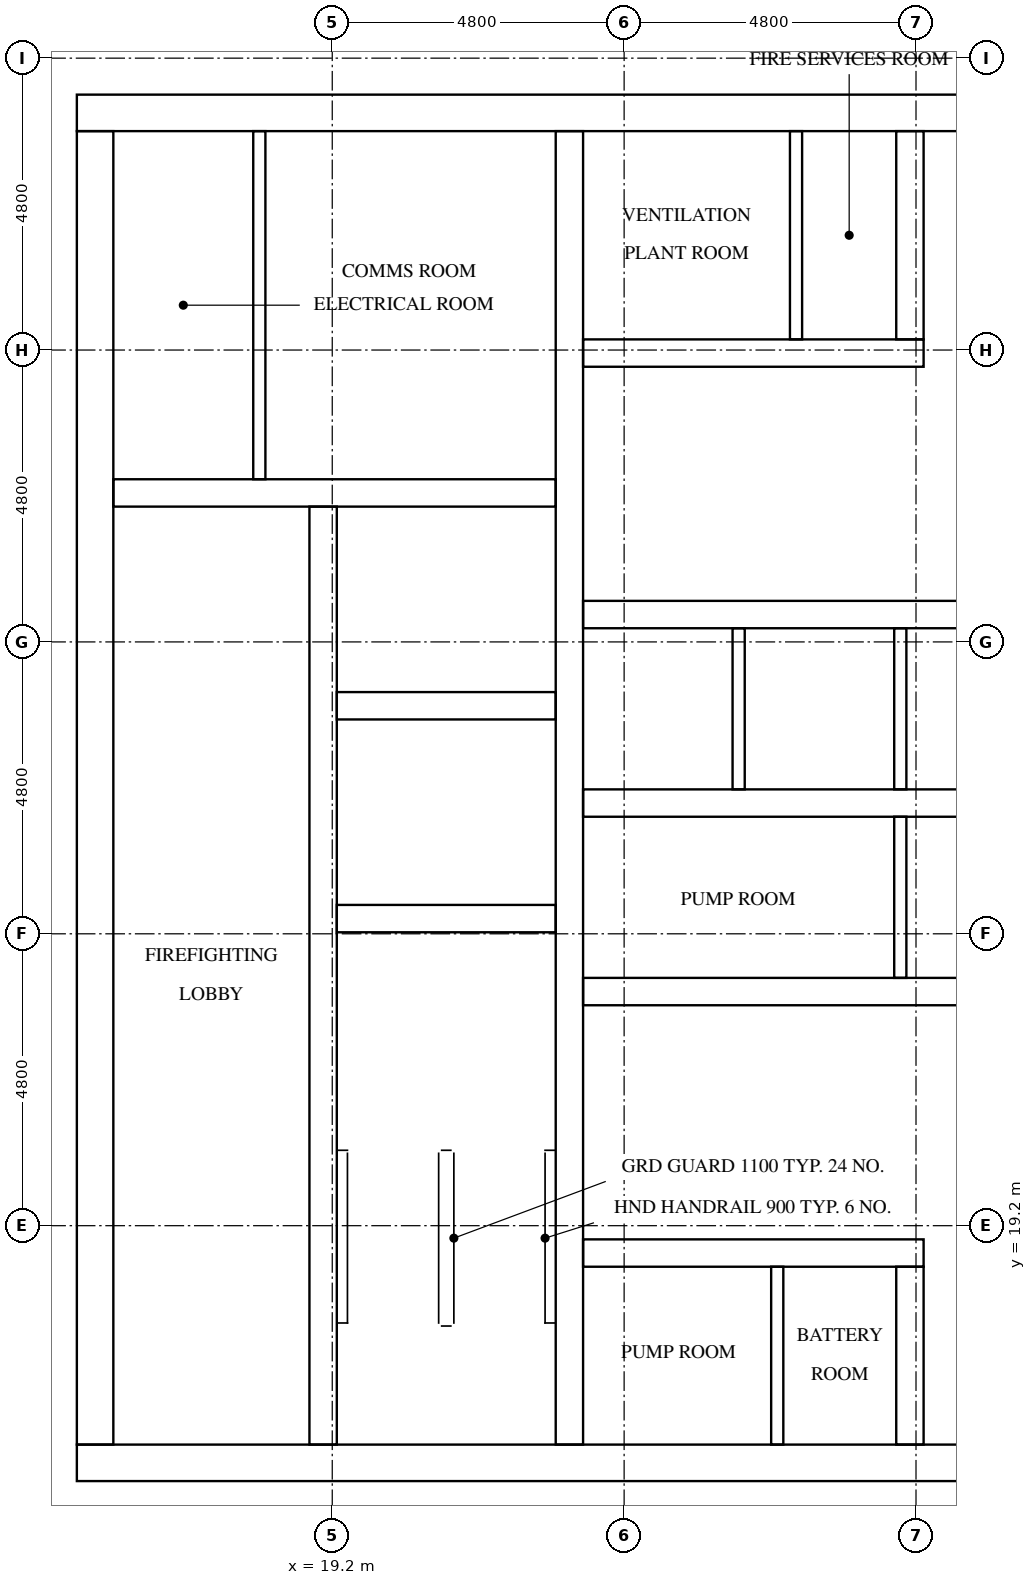
"""IFC4 building model, lengths in metres.
Left out: names, types, materials, properties, quantities, classifications, styles, units other than length and angle.
Written with IfcOpenShell. Run it as: python <this file> out.ifc"""

import sys

from ifc_helpers import new_model, si_unit, direction, frame, frame_2d, origin, place, context, subcontext, project, spatial, rectangle, extrude, element, fill, save


model = new_model("IFC4")
c1 = context("Model", 3, precision=1e-05, world=origin(), true_north=direction((0.0, 1.0)))
c2 = subcontext(c1, "Body", "Model", "MODEL_VIEW")
j1 = project(units=[si_unit("LENGTHUNIT", "METRE"), si_unit("PLANEANGLEUNIT", "RADIAN")], contexts=[c1])
p1 = place(None, origin())
s1 = spatial("IfcSite", under=j1, at=p1, CompositionType="ELEMENT")
p2 = place(p1, origin())
s2 = spatial("IfcBuilding", under=s1, at=p2, CompositionType="ELEMENT")
p3 = place(p2, frame((0.0, 0.0, 249.2)))
s3 = spatial("IfcBuildingStorey", under=s2, at=p3, CompositionType="ELEMENT", Elevation=249.2)
p4 = place(p3, frame((15.0, 15.3, 0.0), z_axis=(0.0, 0.0, 1.0), x_axis=(1.0, 0.0, 0.0)))
e1 = element("IfcWall", 1, at=p4, inside=s3, PredefinedType="SHEAR", context=c2, shape_type="SweptSolid", body=[
    extrude(rectangle(XDim=32.4, YDim=0.6, at=frame_2d((16.2, 0.0))), origin(), (0.0, 0.0, 1.0), 3.2),
])
p5 = place(p4, frame((15.3, 0.0, 0.0)))
e2 = element("IfcOpeningElement", 2, at=p5, cuts=e1, PredefinedType="OPENING", context=c2, shape_type="SweptSolid", body=[
    extrude(rectangle(XDim=1.8, YDim=2.1, at=frame_2d((0.9, 1.05))), frame((0.0, 0.31, 0.0), z_axis=(0.0, -1.0, 0.0), x_axis=(1.0, 0.0, 0.0)), (0.0, 0.0, 1.0), 0.62),
])
p6 = place(p3, frame((15.0, 37.5, 0.0), z_axis=(0.0, 0.0, 1.0), x_axis=(1.0, 0.0, 0.0)))
e3 = element("IfcWall", 3, at=p6, inside=s3, PredefinedType="SHEAR", context=c2, shape_type="SweptSolid", body=[
    extrude(rectangle(XDim=32.4, YDim=0.6, at=frame_2d((16.2, 0.0))), origin(), (0.0, 0.0, 1.0), 3.2),
])
p7 = place(p6, frame((15.3, 0.0, 0.0)))
e4 = element("IfcOpeningElement", 4, at=p7, cuts=e3, PredefinedType="OPENING", context=c2, shape_type="SweptSolid", body=[
    extrude(rectangle(XDim=1.8, YDim=2.1, at=frame_2d((0.9, 1.05))), frame((0.0, 0.31, 0.0), z_axis=(0.0, -1.0, 0.0), x_axis=(1.0, 0.0, 0.0)), (0.0, 0.0, 1.0), 0.62),
])
p8 = place(p6, frame((1.25, 0.0, 0.0)))
e5 = element("IfcOpeningElement", 5, at=p8, cuts=e3, PredefinedType="OPENING", context=c2, shape_type="SweptSolid", body=[
    extrude(rectangle(XDim=1.0, YDim=2.1, at=frame_2d((0.5, 1.05))), frame((0.0, 0.31, 0.0), z_axis=(0.0, -1.0, 0.0), x_axis=(1.0, 0.0, 0.0)), (0.0, 0.0, 1.0), 0.62),
])
p9 = place(p6, frame((4.988, 0.0, 0.0)))
e6 = element("IfcOpeningElement", 6, at=p9, cuts=e3, PredefinedType="OPENING", context=c2, shape_type="SweptSolid", body=[
    extrude(rectangle(XDim=1.0, YDim=2.1, at=frame_2d((0.5, 1.05))), frame((0.0, 0.31, 0.0), z_axis=(0.0, -1.0, 0.0), x_axis=(1.0, 0.0, 0.0)), (0.0, 0.0, 1.0), 0.62),
])
p10 = place(p3, frame((15.3, 15.6, 0.0), z_axis=(0.0, 0.0, 1.0), x_axis=(0.0, 1.0, 0.0)))
e7 = element("IfcWall", 7, at=p10, inside=s3, PredefinedType="SHEAR", context=c2, shape_type="SweptSolid", body=[
    extrude(rectangle(XDim=21.6, YDim=0.6, at=frame_2d((10.8, 0.0))), origin(), (0.0, 0.0, 1.0), 3.2),
])
p11 = place(p10, frame((5.16, 0.0, 0.0)))
e8 = element("IfcOpeningElement", 8, at=p11, cuts=e7, PredefinedType="OPENING", context=c2, shape_type="SweptSolid", body=[
    extrude(rectangle(XDim=1.2, YDim=2.1, at=frame_2d((0.6, 1.05))), frame((0.0, 0.31, 0.0), z_axis=(0.0, -1.0, 0.0), x_axis=(1.0, 0.0, 0.0)), (0.0, 0.0, 1.0), 0.62),
])
p12 = place(p3, frame((19.05, 15.6, 0.0), z_axis=(0.0, 0.0, 1.0), x_axis=(0.0, 1.0, 0.0)))
e9 = element("IfcWall", 9, at=p12, inside=s3, PredefinedType="SHEAR", context=c2, shape_type="SweptSolid", body=[
    extrude(rectangle(XDim=15.425, YDim=0.45, at=frame_2d((7.712, 0.0))), origin(), (0.0, 0.0, 1.0), 3.2),
])
p13 = place(p12, frame((9.85, 0.0, 0.0)))
e10 = element("IfcOpeningElement", 10, at=p13, cuts=e9, PredefinedType="OPENING", context=c2, shape_type="SweptSolid", body=[
    extrude(rectangle(XDim=1.1, YDim=2.1, at=frame_2d((0.55, 1.05))), frame((0.0, 0.235, 0.0), z_axis=(0.0, -1.0, 0.0), x_axis=(1.0, 0.0, 0.0)), (0.0, 0.0, 1.0), 0.47),
])
p14 = place(p12, frame((13.35, 0.0, 0.0)))
e11 = element("IfcOpeningElement", 11, at=p14, cuts=e9, PredefinedType="OPENING", context=c2, shape_type="SweptSolid", body=[
    extrude(rectangle(XDim=1.1, YDim=2.1, at=frame_2d((0.55, 1.05))), frame((0.0, 0.235, 0.0), z_axis=(0.0, -1.0, 0.0), x_axis=(1.0, 0.0, 0.0)), (0.0, 0.0, 1.0), 0.47),
])
p15 = place(p12, frame((0.6, 0.0, 0.0)))
e12 = element("IfcOpeningElement", 12, at=p15, cuts=e9, PredefinedType="OPENING", context=c2, shape_type="SweptSolid", body=[
    extrude(rectangle(XDim=1.2, YDim=2.1, at=frame_2d((0.6, 1.05))), frame((0.0, 0.235, 0.0), z_axis=(0.0, -1.0, 0.0), x_axis=(1.0, 0.0, 0.0)), (0.0, 0.0, 1.0), 0.47),
])
p16 = place(p3, frame((23.1, 15.6, 0.0), z_axis=(0.0, 0.0, 1.0), x_axis=(0.0, 1.0, 0.0)))
e13 = element("IfcWall", 13, at=p16, inside=s3, PredefinedType="SHEAR", context=c2, shape_type="SweptSolid", body=[
    extrude(rectangle(XDim=21.6, YDim=0.45, at=frame_2d((10.8, 0.0))), origin(), (0.0, 0.0, 1.0), 3.2),
])
for number, where, z_axis, x_axis in (
    (14, (19.275, 24.25, 0.0), (0.0, 0.0, 1.0), (1.0, 0.0, 0.0)),
    (15, (19.275, 27.75, 0.0), (0.0, 0.0, 1.0), (1.0, 0.0, 0.0)),
):
    element("IfcWall", number, at=place(p3, frame(where, z_axis=z_axis, x_axis=x_axis)), inside=s3, PredefinedType="SHEAR", context=c2, shape_type="SweptSolid", body=[
        extrude(rectangle(XDim=3.6, YDim=0.45, at=frame_2d((1.8, 0.0))), origin(), (0.0, 0.0, 1.0), 3.2),
    ])
p17 = place(p3, frame((15.6, 31.25, 0.0), z_axis=(0.0, 0.0, 1.0), x_axis=(1.0, 0.0, 0.0)))
e16 = element("IfcWall", 16, at=p17, inside=s3, PredefinedType="SHEAR", context=c2, shape_type="SweptSolid", body=[
    extrude(rectangle(XDim=7.275, YDim=0.45, at=frame_2d((3.637, 0.0))), origin(), (0.0, 0.0, 1.0), 3.2),
])
p18 = place(p3, frame((23.325, 18.75, 0.0), z_axis=(0.0, 0.0, 1.0), x_axis=(1.0, 0.0, 0.0)))
e17 = element("IfcWall", 17, at=p18, inside=s3, PredefinedType="SHEAR", context=c2, shape_type="SweptSolid", body=[
    extrude(rectangle(XDim=5.6, YDim=0.45, at=frame_2d((2.8, 0.0))), origin(), (0.0, 0.0, 1.0), 3.2),
])
p19 = place(p18, frame((1.046, 0.0, 0.0)))
e18 = element("IfcOpeningElement", 18, at=p19, cuts=e17, PredefinedType="OPENING", context=c2, shape_type="SweptSolid", body=[
    extrude(rectangle(XDim=1.0, YDim=2.1, at=frame_2d((0.5, 1.05))), frame((0.0, 0.235, 0.0), z_axis=(0.0, -1.0, 0.0), x_axis=(1.0, 0.0, 0.0)), (0.0, 0.0, 1.0), 0.47),
])
p20 = place(p18, frame((3.721, 0.0, 0.0)))
e19 = element("IfcOpeningElement", 19, at=p20, cuts=e17, PredefinedType="OPENING", context=c2, shape_type="SweptSolid", body=[
    extrude(rectangle(XDim=1.0, YDim=2.1, at=frame_2d((0.5, 1.05))), frame((0.0, 0.235, 0.0), z_axis=(0.0, -1.0, 0.0), x_axis=(1.0, 0.0, 0.0)), (0.0, 0.0, 1.0), 0.47),
])
p21 = place(p3, frame((23.325, 23.05, 0.0), z_axis=(0.0, 0.0, 1.0), x_axis=(1.0, 0.0, 0.0)))
e20 = element("IfcWall", 20, at=p21, inside=s3, PredefinedType="SHEAR", context=c2, shape_type="SweptSolid", body=[
    extrude(rectangle(XDim=15.75, YDim=0.45, at=frame_2d((7.875, 0.0))), origin(), (0.0, 0.0, 1.0), 3.2),
])
p22 = place(p21, frame((2.058, 0.0, 0.0)))
e21 = element("IfcOpeningElement", 21, at=p22, cuts=e20, PredefinedType="OPENING", context=c2, shape_type="SweptSolid", body=[
    extrude(rectangle(XDim=1.0, YDim=2.1, at=frame_2d((0.5, 1.05))), frame((0.0, 0.235, 0.0), z_axis=(0.0, -1.0, 0.0), x_axis=(1.0, 0.0, 0.0)), (0.0, 0.0, 1.0), 0.47),
])
p23 = place(p21, frame((11.823, 0.0, 0.0)))
e22 = element("IfcOpeningElement", 22, at=p23, cuts=e20, PredefinedType="OPENING", context=c2, shape_type="SweptSolid", body=[
    extrude(rectangle(XDim=1.0, YDim=2.1, at=frame_2d((0.5, 1.05))), frame((0.0, 0.235, 0.0), z_axis=(0.0, -1.0, 0.0), x_axis=(1.0, 0.0, 0.0)), (0.0, 0.0, 1.0), 0.47),
])
p24 = place(p21, frame((14.481, 0.0, 0.0)))
e23 = element("IfcOpeningElement", 23, at=p24, cuts=e20, PredefinedType="OPENING", context=c2, shape_type="SweptSolid", body=[
    extrude(rectangle(XDim=1.0, YDim=2.1, at=frame_2d((0.5, 1.05))), frame((0.0, 0.235, 0.0), z_axis=(0.0, -1.0, 0.0), x_axis=(1.0, 0.0, 0.0)), (0.0, 0.0, 1.0), 0.47),
])
p25 = place(p3, frame((23.325, 26.15, 0.0), z_axis=(0.0, 0.0, 1.0), x_axis=(1.0, 0.0, 0.0)))
e24 = element("IfcWall", 24, at=p25, inside=s3, PredefinedType="SHEAR", context=c2, shape_type="SweptSolid", body=[
    extrude(rectangle(XDim=15.75, YDim=0.45, at=frame_2d((7.875, 0.0))), origin(), (0.0, 0.0, 1.0), 3.2),
])
p26 = place(p3, frame((23.325, 29.25, 0.0), z_axis=(0.0, 0.0, 1.0), x_axis=(1.0, 0.0, 0.0)))
e25 = element("IfcWall", 25, at=p26, inside=s3, PredefinedType="SHEAR", context=c2, shape_type="SweptSolid", body=[
    extrude(rectangle(XDim=15.75, YDim=0.45, at=frame_2d((7.875, 0.0))), origin(), (0.0, 0.0, 1.0), 3.2),
])
p27 = place(p26, frame((0.679, 0.0, 0.0)))
e26 = element("IfcOpeningElement", 26, at=p27, cuts=e25, PredefinedType="OPENING", context=c2, shape_type="SweptSolid", body=[
    extrude(rectangle(XDim=1.1, YDim=2.1, at=frame_2d((0.55, 1.05))), frame((0.0, 0.235, 0.0), z_axis=(0.0, -1.0, 0.0), x_axis=(1.0, 0.0, 0.0)), (0.0, 0.0, 1.0), 0.47),
])
p28 = place(p26, frame((3.337, 0.0, 0.0)))
e27 = element("IfcOpeningElement", 27, at=p28, cuts=e25, PredefinedType="OPENING", context=c2, shape_type="SweptSolid", body=[
    extrude(rectangle(XDim=1.1, YDim=2.1, at=frame_2d((0.55, 1.05))), frame((0.0, 0.235, 0.0), z_axis=(0.0, -1.0, 0.0), x_axis=(1.0, 0.0, 0.0)), (0.0, 0.0, 1.0), 0.47),
])
p29 = place(p26, frame((5.996, 0.0, 0.0)))
e28 = element("IfcOpeningElement", 28, at=p29, cuts=e25, PredefinedType="OPENING", context=c2, shape_type="SweptSolid", body=[
    extrude(rectangle(XDim=1.1, YDim=2.1, at=frame_2d((0.55, 1.05))), frame((0.0, 0.235, 0.0), z_axis=(0.0, -1.0, 0.0), x_axis=(1.0, 0.0, 0.0)), (0.0, 0.0, 1.0), 0.47),
])
p30 = place(p26, frame((8.654, 0.0, 0.0)))
e29 = element("IfcOpeningElement", 29, at=p30, cuts=e25, PredefinedType="OPENING", context=c2, shape_type="SweptSolid", body=[
    extrude(rectangle(XDim=1.1, YDim=2.1, at=frame_2d((0.55, 1.05))), frame((0.0, 0.235, 0.0), z_axis=(0.0, -1.0, 0.0), x_axis=(1.0, 0.0, 0.0)), (0.0, 0.0, 1.0), 0.47),
])
p31 = place(p26, frame((11.312, 0.0, 0.0)))
e30 = element("IfcOpeningElement", 30, at=p31, cuts=e25, PredefinedType="OPENING", context=c2, shape_type="SweptSolid", body=[
    extrude(rectangle(XDim=1.1, YDim=2.1, at=frame_2d((0.55, 1.05))), frame((0.0, 0.235, 0.0), z_axis=(0.0, -1.0, 0.0), x_axis=(1.0, 0.0, 0.0)), (0.0, 0.0, 1.0), 0.47),
])
p32 = place(p26, frame((13.971, 0.0, 0.0)))
e31 = element("IfcOpeningElement", 31, at=p32, cuts=e25, PredefinedType="OPENING", context=c2, shape_type="SweptSolid", body=[
    extrude(rectangle(XDim=1.1, YDim=2.1, at=frame_2d((0.55, 1.05))), frame((0.0, 0.235, 0.0), z_axis=(0.0, -1.0, 0.0), x_axis=(1.0, 0.0, 0.0)), (0.0, 0.0, 1.0), 0.47),
])
p33 = place(p3, frame((23.325, 33.55, 0.0), z_axis=(0.0, 0.0, 1.0), x_axis=(1.0, 0.0, 0.0)))
e32 = element("IfcWall", 32, at=p33, inside=s3, PredefinedType="SHEAR", context=c2, shape_type="SweptSolid", body=[
    extrude(rectangle(XDim=5.6, YDim=0.45, at=frame_2d((2.8, 0.0))), origin(), (0.0, 0.0, 1.0), 3.2),
])
p34 = place(p33, frame((1.201, 0.0, 0.0)))
e33 = element("IfcOpeningElement", 33, at=p34, cuts=e32, PredefinedType="OPENING", context=c2, shape_type="SweptSolid", body=[
    extrude(rectangle(XDim=1.0, YDim=2.1, at=frame_2d((0.5, 1.05))), frame((0.0, 0.235, 0.0), z_axis=(0.0, -1.0, 0.0), x_axis=(1.0, 0.0, 0.0)), (0.0, 0.0, 1.0), 0.47),
])
p35 = place(p33, frame((3.876, 0.0, 0.0)))
e34 = element("IfcOpeningElement", 34, at=p35, cuts=e32, PredefinedType="OPENING", context=c2, shape_type="SweptSolid", body=[
    extrude(rectangle(XDim=1.0, YDim=2.1, at=frame_2d((0.5, 1.05))), frame((0.0, 0.235, 0.0), z_axis=(0.0, -1.0, 0.0), x_axis=(1.0, 0.0, 0.0)), (0.0, 0.0, 1.0), 0.47),
])
p36 = place(p3, frame((28.7, 15.6, 0.0), z_axis=(0.0, 0.0, 1.0), x_axis=(0.0, 1.0, 0.0)))
e35 = element("IfcWall", 35, at=p36, inside=s3, PredefinedType="SHEAR", context=c2, shape_type="SweptSolid", body=[
    extrude(rectangle(XDim=2.925, YDim=0.45, at=frame_2d((1.462, 0.0))), origin(), (0.0, 0.0, 1.0), 3.2),
])
p37 = place(p3, frame((28.7, 33.775, 0.0), z_axis=(0.0, 0.0, 1.0), x_axis=(0.0, 1.0, 0.0)))
e36 = element("IfcWall", 36, at=p37, inside=s3, PredefinedType="SHEAR", context=c2, shape_type="SweptSolid", body=[
    extrude(rectangle(XDim=3.425, YDim=0.45, at=frame_2d((1.712, 0.0))), origin(), (0.0, 0.0, 1.0), 3.2),
])
p38 = place(p3, frame((25.883, 26.375, 0.0), z_axis=(0.0, 0.0, 1.0), x_axis=(0.0, 1.0, 0.0)))
e37 = element("IfcWall", 37, at=p38, inside=s3, PredefinedType="SOLIDWALL", context=c2, shape_type="SweptSolid", body=[
    extrude(rectangle(XDim=2.65, YDim=0.2, at=frame_2d((1.325, 0.0))), origin(), (0.0, 0.0, 1.0), 3.2),
])
p39 = place(p3, frame((28.542, 23.275, 0.0), z_axis=(0.0, 0.0, 1.0), x_axis=(0.0, 1.0, 0.0)))
e38 = element("IfcWall", 38, at=p39, inside=s3, PredefinedType="SOLIDWALL", context=c2, shape_type="SweptSolid", body=[
    extrude(rectangle(XDim=2.65, YDim=0.2, at=frame_2d((1.325, 0.0))), origin(), (0.0, 0.0, 1.0), 3.2),
])
p40 = place(p3, frame((28.542, 26.375, 0.0), z_axis=(0.0, 0.0, 1.0), x_axis=(0.0, 1.0, 0.0)))
e39 = element("IfcWall", 39, at=p40, inside=s3, PredefinedType="SOLIDWALL", context=c2, shape_type="SweptSolid", body=[
    extrude(rectangle(XDim=2.65, YDim=0.2, at=frame_2d((1.325, 0.0))), origin(), (0.0, 0.0, 1.0), 3.2),
])
p41 = place(p3, frame((18.001, 31.475, 0.0), z_axis=(0.0, 0.0, 1.0), x_axis=(0.0, 1.0, 0.0)))
e40 = element("IfcWall", 40, at=p41, inside=s3, PredefinedType="PARTITIONING", context=c2, shape_type="SweptSolid", body=[
    extrude(rectangle(XDim=5.725, YDim=0.2, at=frame_2d((2.862, 0.0))), origin(), (0.0, 0.0, 1.0), 3.2),
])
p42 = place(p3, frame((26.518, 15.6, 0.0), z_axis=(0.0, 0.0, 1.0), x_axis=(0.0, 1.0, 0.0)))
e41 = element("IfcWall", 41, at=p42, inside=s3, PredefinedType="PARTITIONING", context=c2, shape_type="SweptSolid", body=[
    extrude(rectangle(XDim=2.925, YDim=0.2, at=frame_2d((1.462, 0.0))), origin(), (0.0, 0.0, 1.0), 3.2),
])
p43 = place(p3, frame((26.827, 33.775, 0.0), z_axis=(0.0, 0.0, 1.0), x_axis=(0.0, 1.0, 0.0)))
e42 = element("IfcWall", 42, at=p43, inside=s3, PredefinedType="PARTITIONING", context=c2, shape_type="SweptSolid", body=[
    extrude(rectangle(XDim=3.425, YDim=0.2, at=frame_2d((1.712, 0.0))), origin(), (0.0, 0.0, 1.0), 3.2),
])
p44 = place(p27, origin())
e43 = element("IfcDoor", 43, at=p44, inside=s3, OperationType="DOUBLE_DOOR_SLIDING", PredefinedType="DOOR", context=c2, shape_type="SweptSolid", body=[
    extrude(rectangle(XDim=1.1, YDim=2.1, at=frame_2d((0.55, 1.05))), frame((0.0, 0.025, 0.0), z_axis=(0.0, -1.0, 0.0), x_axis=(1.0, 0.0, 0.0)), (0.0, 0.0, 1.0), 0.05),
])
fill(e26, e43)
p45 = place(p28, origin())
e44 = element("IfcDoor", 44, at=p45, inside=s3, OperationType="DOUBLE_DOOR_SLIDING", PredefinedType="DOOR", context=c2, shape_type="SweptSolid", body=[
    extrude(rectangle(XDim=1.1, YDim=2.1, at=frame_2d((0.55, 1.05))), frame((0.0, 0.025, 0.0), z_axis=(0.0, -1.0, 0.0), x_axis=(1.0, 0.0, 0.0)), (0.0, 0.0, 1.0), 0.05),
])
fill(e27, e44)
p46 = place(p29, origin())
e45 = element("IfcDoor", 45, at=p46, inside=s3, OperationType="DOUBLE_DOOR_SLIDING", PredefinedType="DOOR", context=c2, shape_type="SweptSolid", body=[
    extrude(rectangle(XDim=1.1, YDim=2.1, at=frame_2d((0.55, 1.05))), frame((0.0, 0.025, 0.0), z_axis=(0.0, -1.0, 0.0), x_axis=(1.0, 0.0, 0.0)), (0.0, 0.0, 1.0), 0.05),
])
fill(e28, e45)
p47 = place(p13, origin())
e46 = element("IfcDoor", 46, at=p47, inside=s3, OperationType="DOUBLE_DOOR_SLIDING", PredefinedType="DOOR", context=c2, shape_type="SweptSolid", body=[
    extrude(rectangle(XDim=1.1, YDim=2.1, at=frame_2d((0.55, 1.05))), frame((0.0, 0.025, 0.0), z_axis=(0.0, -1.0, 0.0), x_axis=(1.0, 0.0, 0.0)), (0.0, 0.0, 1.0), 0.05),
])
fill(e10, e46)
p48 = place(p14, origin())
e47 = element("IfcDoor", 47, at=p48, inside=s3, OperationType="DOUBLE_DOOR_SLIDING", PredefinedType="DOOR", context=c2, shape_type="SweptSolid", body=[
    extrude(rectangle(XDim=1.1, YDim=2.1, at=frame_2d((0.55, 1.05))), frame((0.0, 0.025, 0.0), z_axis=(0.0, -1.0, 0.0), x_axis=(1.0, 0.0, 0.0)), (0.0, 0.0, 1.0), 0.05),
])
fill(e11, e47)
p49 = place(p15, frame((1.2, 0.0, 0.0), z_axis=(0.0, 0.0, 1.0), x_axis=(-1.0, 0.0, 0.0)))
e48 = element("IfcDoor", 48, at=p49, inside=s3, OperationType="SINGLE_SWING_LEFT", PredefinedType="DOOR", context=c2, shape_type="SweptSolid", body=[
    extrude(rectangle(XDim=1.2, YDim=2.1, at=frame_2d((0.6, 1.05))), frame((0.0, 0.025, 0.0), z_axis=(0.0, -1.0, 0.0), x_axis=(1.0, 0.0, 0.0)), (0.0, 0.0, 1.0), 0.05),
])
fill(e12, e48)
p50 = place(p11, frame((1.2, 0.0, 0.0), z_axis=(0.0, 0.0, 1.0), x_axis=(-1.0, 0.0, 0.0)))
e49 = element("IfcDoor", 49, at=p50, inside=s3, OperationType="SINGLE_SWING_RIGHT", PredefinedType="DOOR", context=c2, shape_type="SweptSolid", body=[
    extrude(rectangle(XDim=1.2, YDim=2.1, at=frame_2d((0.6, 1.05))), frame((0.0, 0.025, 0.0), z_axis=(0.0, -1.0, 0.0), x_axis=(1.0, 0.0, 0.0)), (0.0, 0.0, 1.0), 0.05),
])
fill(e8, e49)
p51 = place(p8, origin())
e50 = element("IfcDoor", 50, at=p51, inside=s3, OperationType="SINGLE_SWING_RIGHT", PredefinedType="DOOR", context=c2, shape_type="SweptSolid", body=[
    extrude(rectangle(XDim=1.0, YDim=2.1, at=frame_2d((0.5, 1.05))), frame((0.0, 0.025, 0.0), z_axis=(0.0, -1.0, 0.0), x_axis=(1.0, 0.0, 0.0)), (0.0, 0.0, 1.0), 0.05),
])
fill(e5, e50)
p52 = place(p9, origin())
e51 = element("IfcDoor", 51, at=p52, inside=s3, OperationType="SINGLE_SWING_LEFT", PredefinedType="DOOR", context=c2, shape_type="SweptSolid", body=[
    extrude(rectangle(XDim=1.0, YDim=2.1, at=frame_2d((0.5, 1.05))), frame((0.0, 0.025, 0.0), z_axis=(0.0, -1.0, 0.0), x_axis=(1.0, 0.0, 0.0)), (0.0, 0.0, 1.0), 0.05),
])
fill(e6, e51)
p53 = place(p22, frame((1.0, 0.0, 0.0), z_axis=(0.0, 0.0, 1.0), x_axis=(-1.0, 0.0, 0.0)))
e52 = element("IfcDoor", 52, at=p53, inside=s3, OperationType="SINGLE_SWING_RIGHT", PredefinedType="DOOR", context=c2, shape_type="SweptSolid", body=[
    extrude(rectangle(XDim=1.0, YDim=2.1, at=frame_2d((0.5, 1.05))), frame((0.0, 0.025, 0.0), z_axis=(0.0, -1.0, 0.0), x_axis=(1.0, 0.0, 0.0)), (0.0, 0.0, 1.0), 0.05),
])
fill(e21, e52)
p54 = place(p19, origin())
e53 = element("IfcDoor", 53, at=p54, inside=s3, OperationType="SINGLE_SWING_LEFT", PredefinedType="DOOR", context=c2, shape_type="SweptSolid", body=[
    extrude(rectangle(XDim=1.0, YDim=2.1, at=frame_2d((0.5, 1.05))), frame((0.0, 0.025, 0.0), z_axis=(0.0, -1.0, 0.0), x_axis=(1.0, 0.0, 0.0)), (0.0, 0.0, 1.0), 0.05),
])
fill(e18, e53)
p55 = place(p20, origin())
e54 = element("IfcDoor", 54, at=p55, inside=s3, OperationType="SINGLE_SWING_RIGHT", PredefinedType="DOOR", context=c2, shape_type="SweptSolid", body=[
    extrude(rectangle(XDim=1.0, YDim=2.1, at=frame_2d((0.5, 1.05))), frame((0.0, 0.025, 0.0), z_axis=(0.0, -1.0, 0.0), x_axis=(1.0, 0.0, 0.0)), (0.0, 0.0, 1.0), 0.05),
])
fill(e19, e54)
p56 = place(p34, frame((1.0, 0.0, 0.0), z_axis=(0.0, 0.0, 1.0), x_axis=(-1.0, 0.0, 0.0)))
e55 = element("IfcDoor", 55, at=p56, inside=s3, OperationType="SINGLE_SWING_LEFT", PredefinedType="DOOR", context=c2, shape_type="SweptSolid", body=[
    extrude(rectangle(XDim=1.0, YDim=2.1, at=frame_2d((0.5, 1.05))), frame((0.0, 0.025, 0.0), z_axis=(0.0, -1.0, 0.0), x_axis=(1.0, 0.0, 0.0)), (0.0, 0.0, 1.0), 0.05),
])
fill(e33, e55)
p57 = place(p35, frame((1.0, 0.0, 0.0), z_axis=(0.0, 0.0, 1.0), x_axis=(-1.0, 0.0, 0.0)))
e56 = element("IfcDoor", 56, at=p57, inside=s3, OperationType="SINGLE_SWING_RIGHT", PredefinedType="DOOR", context=c2, shape_type="SweptSolid", body=[
    extrude(rectangle(XDim=1.0, YDim=2.1, at=frame_2d((0.5, 1.05))), frame((0.0, 0.025, 0.0), z_axis=(0.0, -1.0, 0.0), x_axis=(1.0, 0.0, 0.0)), (0.0, 0.0, 1.0), 0.05),
])
fill(e34, e56)
save(model, sys.argv[1])
